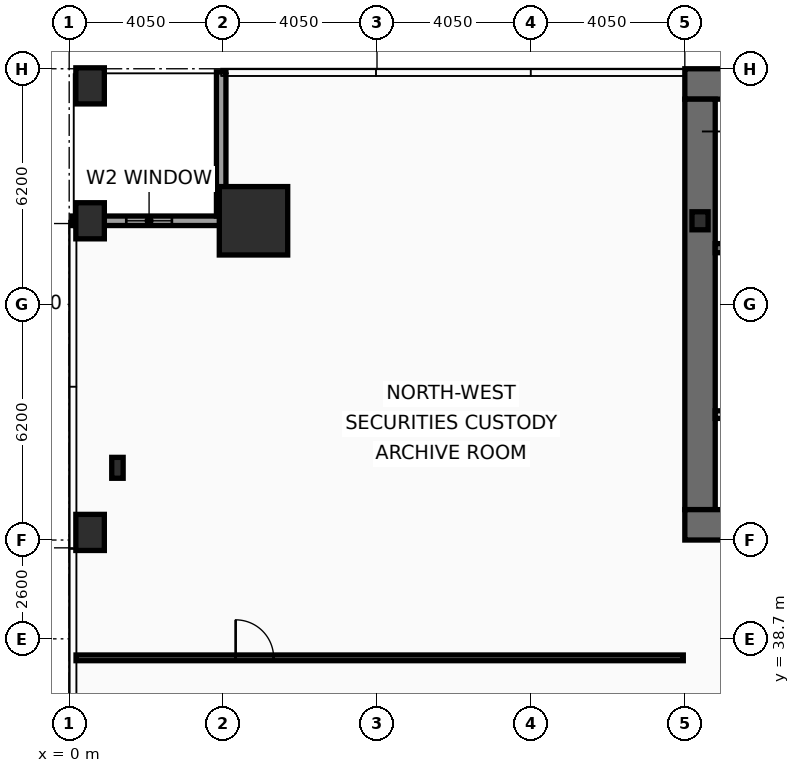
"""IFC4 building model, lengths in metres.
Left out: names, types, materials, properties, quantities, classifications, styles, units other than length and angle.
Written with IfcOpenShell. Run it as: python <this file> out.ifc"""

import sys

from ifc_helpers import new_model, si_unit, direction, frame, frame_2d, origin, origin_2d, place, context, subcontext, project, spatial, rectangle, hollow_rectangle, i_section, extrude, element, fill, save


model = new_model("IFC4")
c1 = context("Model", 3, precision=1e-05, world=origin(), true_north=direction((0.0, 1.0)))
c2 = subcontext(c1, "Body", "Model", "MODEL_VIEW")
j1 = project(units=[si_unit("LENGTHUNIT", "METRE"), si_unit("PLANEANGLEUNIT", "RADIAN")], contexts=[c1])
p1 = place(None, origin())
s1 = spatial("IfcSite", under=j1, at=p1, CompositionType="ELEMENT")
p2 = place(p1, origin())
s2 = spatial("IfcBuilding", under=s1, at=p2, CompositionType="ELEMENT")
p3 = place(p2, frame((0.0, 0.0, 10.4)))
s3 = spatial("IfcBuildingStorey", under=s2, at=p3, CompositionType="ELEMENT", Elevation=10.4)
p4 = place(p3, frame((16.2, 53.3, 0.0), z_axis=(0.0, 0.0, 1.0), x_axis=(1.0, 0.0, 0.0)))
e1 = element("IfcWall", 1, at=p4, inside=s3, PredefinedType="SHEAR", context=c2, shape_type="SweptSolid", body=[
    extrude(rectangle(XDim=40.5, YDim=0.8, at=frame_2d((20.25, 0.0))), origin(), (0.0, 0.0, 1.0), 4.8),
])
p5 = place(p3, frame((16.6, 42.1, 0.0), z_axis=(0.0, 0.0, 1.0), x_axis=(0.0, 1.0, 0.0)))
e2 = element("IfcWall", 2, at=p5, inside=s3, PredefinedType="SHEAR", context=c2, shape_type="SweptSolid", body=[
    extrude(rectangle(XDim=10.8, YDim=0.8, at=frame_2d((5.4, 0.0))), origin(), (0.0, 0.0, 1.0), 4.8),
])
p6 = place(p3, frame((18.65, 41.7, 0.0), z_axis=(0.0, 0.0, 1.0), x_axis=(-1.0, 0.0, 0.0)))
e3 = element("IfcWall", 3, at=p6, inside=s3, PredefinedType="SHEAR", context=c2, shape_type="SweptSolid", body=[
    extrude(rectangle(XDim=2.45, YDim=0.8, at=frame_2d((1.225, 0.0))), origin(), (0.0, 0.0, 1.0), 4.8),
])
p7 = place(p3, frame((17.0, 48.98, 0.0), z_axis=(0.0, 0.0, 1.0), x_axis=(1.0, 0.0, 0.0)))
e4 = element("IfcWall", 4, at=p7, inside=s3, PredefinedType="SHEAR", context=c2, shape_type="SweptSolid", body=[
    extrude(rectangle(XDim=7.22, YDim=0.24, at=frame_2d((3.61, 0.0))), origin(), (0.0, 0.0, 1.0), 4.8),
])
p8 = place(p7, frame((0.22, 0.0, 0.0)))
e5 = element("IfcOpeningElement", 5, at=p8, cuts=e4, PredefinedType="OPENING", context=c2, shape_type="SweptSolid", body=[
    extrude(rectangle(XDim=1.05, YDim=2.15, at=frame_2d((0.525, 1.075))), frame((0.0, 0.13, 0.0), z_axis=(0.0, -1.0, 0.0), x_axis=(1.0, 0.0, 0.0)), (0.0, 0.0, 1.0), 0.26),
])
p9 = place(p3, frame((4.85, 49.7, 0.0), z_axis=(0.0, 0.0, 1.0), x_axis=(1.0, 0.0, 0.0)))
e6 = element("IfcColumn", 6, at=p9, inside=s3, PredefinedType="COLUMN", context=c2, shape_type="SweptSolid", body=[
    extrude(hollow_rectangle(XDim=1.8, YDim=1.8, WallThickness=0.08, at=origin_2d()), origin(), (0.0, 0.0, 1.0), 5.0),
])
p10 = place(p3, frame((1.27, 43.2, 0.0), z_axis=(0.0, 0.0, 1.0), x_axis=(1.0, 0.0, 0.0)))
e7 = element("IfcColumn", 7, at=p10, inside=s3, PredefinedType="COLUMN", context=c2, shape_type="SweptSolid", body=[
    extrude(i_section(OverallWidth=0.3, OverallDepth=0.55, WebThickness=0.015, FlangeThickness=0.029, at=origin_2d()), origin(), (0.0, 0.0, 1.0), 5.0),
])
p11 = place(p3, frame((16.6, 49.7, 0.0), z_axis=(0.0, 0.0, 1.0), x_axis=(1.0, 0.0, 0.0)))
e8 = element("IfcColumn", 8, at=p11, inside=s3, PredefinedType="COLUMN", context=c2, shape_type="SweptSolid", body=[
    extrude(i_section(OverallWidth=0.424, OverallDepth=0.474, WebThickness=0.048, FlangeThickness=0.077, at=origin_2d()), origin(), (0.0, 0.0, 1.0), 5.0),
])
for number, where, z_axis, x_axis in (
    (9, (0.55, 49.7, 0.0), (0.0, 0.0, 1.0), (1.0, 0.0, 0.0)),
    (10, (0.55, 53.25, 0.0), (0.0, 0.0, 1.0), (1.0, 0.0, 0.0)),
    (11, (0.55, 41.5, 0.0), (0.0, 0.0, 1.0), (1.0, 0.0, 0.0)),
):
    element("IfcColumn", number, at=place(p3, frame(where, z_axis=z_axis, x_axis=x_axis)), inside=s3, PredefinedType="PILASTER", context=c2, shape_type="SweptSolid", body=[
        extrude(rectangle(XDim=0.75, YDim=0.95, at=origin_2d()), origin(), (0.0, 0.0, 1.0), 5.0),
    ])
p12 = place(p3, frame((0.08, 49.7, 0.0), z_axis=(0.0, 0.0, 1.0), x_axis=(1.0, 0.0, 0.0)))
e12 = element("IfcWall", 12, at=p12, inside=s3, PredefinedType="SOLIDWALL", context=c2, shape_type="SweptSolid", body=[
    extrude(rectangle(XDim=4.045, YDim=0.25, at=frame_2d((2.022, 0.0))), origin(), (0.0, 0.0, 1.0), 4.14),
])
p13 = place(p12, frame((1.423, 0.0, 0.9)))
e13 = element("IfcOpeningElement", 13, at=p13, cuts=e12, PredefinedType="OPENING", context=c2, shape_type="SweptSolid", body=[
    extrude(rectangle(XDim=1.2, YDim=2.8, at=frame_2d((0.6, 1.4))), frame((0.0, 0.135, 0.0), z_axis=(0.0, -1.0, 0.0), x_axis=(1.0, 0.0, 0.0)), (0.0, 0.0, 1.0), 0.27),
])
p14 = place(p3, frame((4.0, 49.825, 0.0), z_axis=(0.0, 0.0, 1.0), x_axis=(0.0, 1.0, 0.0)))
e14 = element("IfcWall", 14, at=p14, inside=s3, PredefinedType="SOLIDWALL", context=c2, shape_type="SweptSolid", body=[
    extrude(rectangle(XDim=3.795, YDim=0.25, at=frame_2d((1.897, 0.0))), origin(), (0.0, 0.0, 1.0), 4.14),
])
p15 = place(p3, frame((17.0, 44.6, 0.0), z_axis=(0.0, 0.0, 1.0), x_axis=(1.0, 0.0, 0.0)))
e15 = element("IfcWall", 15, at=p15, inside=s3, PredefinedType="PARTITIONING", context=c2, shape_type="SweptSolid", body=[
    extrude(rectangle(XDim=4.0, YDim=0.2, at=frame_2d((2.0, 0.0))), origin(), (0.0, 0.0, 1.0), 4.8),
])
p16 = place(p15, frame((1.25, 0.0, 0.0)))
e16 = element("IfcOpeningElement", 16, at=p16, cuts=e15, PredefinedType="OPENING", context=c2, shape_type="SweptSolid", body=[
    extrude(rectangle(XDim=1.05, YDim=2.15, at=frame_2d((0.525, 1.075))), frame((0.0, 0.11, 0.0), z_axis=(0.0, -1.0, 0.0), x_axis=(1.0, 0.0, 0.0)), (0.0, 0.0, 1.0), 0.22),
])
p17 = place(p3, frame((0.18, 38.2, 0.0), z_axis=(0.0, 0.0, 1.0), x_axis=(1.0, 0.0, 0.0)))
e17 = element("IfcWall", 17, at=p17, inside=s3, PredefinedType="PARTITIONING", context=c2, shape_type="SweptSolid", body=[
    extrude(rectangle(XDim=15.98, YDim=0.15, at=frame_2d((7.99, 0.0))), origin(), (0.0, 0.0, 1.0), 4.14),
])
p18 = place(p17, frame((4.2, 0.0, 0.0)))
e18 = element("IfcOpeningElement", 18, at=p18, cuts=e17, PredefinedType="OPENING", context=c2, shape_type="SweptSolid", body=[
    extrude(rectangle(XDim=1.0, YDim=2.05, at=frame_2d((0.5, 1.025))), frame((0.0, 0.085, 0.0), z_axis=(0.0, -1.0, 0.0), x_axis=(1.0, 0.0, 0.0)), (0.0, 0.0, 1.0), 0.17),
])
p19 = place(p13, origin())
e19 = element("IfcWindow", 19, at=p19, inside=s3, PartitioningType="SINGLE_PANEL", PredefinedType="WINDOW", context=c2, shape_type="SweptSolid", body=[
    extrude(rectangle(XDim=1.2, YDim=2.8, at=frame_2d((0.6, 1.4))), frame((0.0, 0.03, 0.0), z_axis=(0.0, -1.0, 0.0), x_axis=(1.0, 0.0, 0.0)), (0.0, 0.0, 1.0), 0.06),
])
fill(e13, e19)
p20 = place(p18, origin())
e20 = element("IfcDoor", 20, at=p20, inside=s3, OperationType="SINGLE_SWING_LEFT", PredefinedType="DOOR", context=c2, shape_type="SweptSolid", body=[
    extrude(rectangle(XDim=1.0, YDim=2.05, at=frame_2d((0.5, 1.025))), frame((0.0, 0.025, 0.0), z_axis=(0.0, -1.0, 0.0), x_axis=(1.0, 0.0, 0.0)), (0.0, 0.0, 1.0), 0.05),
])
fill(e18, e20)
save(model, sys.argv[1])
